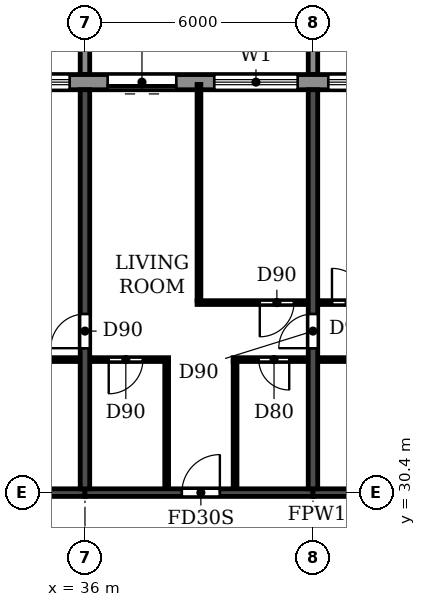
"""IFC4 building model, lengths in metres.
Left out: names, types, materials, properties, quantities, classifications, styles, units other than length and angle.
Written with IfcOpenShell. Run it as: python <this file> out.ifc"""

import sys

from ifc_helpers import new_model, si_unit, direction, frame, frame_2d, origin, place, context, subcontext, project, spatial, polyline, rectangle, outline, extrude, source, transform, mapped, element, fill, save


model = new_model("IFC4")
c1 = context("Model", 3, precision=1e-05, world=origin(), true_north=direction((0.0, 1.0)))
c2 = subcontext(c1, "Body", "Model", "MODEL_VIEW")
j1 = project(units=[si_unit("LENGTHUNIT", "METRE"), si_unit("PLANEANGLEUNIT", "RADIAN")], contexts=[c1])
p1 = place(None, origin())
s1 = spatial("IfcSite", under=j1, at=p1, CompositionType="ELEMENT")
p2 = place(p1, origin())
s2 = spatial("IfcBuilding", under=s1, at=p2, CompositionType="ELEMENT")
p3 = place(p2, frame((0.0, 0.0, 241.2)))
s3 = spatial("IfcBuildingStorey", under=s2, at=p3, CompositionType="ELEMENT", Elevation=241.2)
p4 = place(p3, frame((36.0, 30.5, 0.0), z_axis=(0.0, 0.0, 1.0), x_axis=(0.0, 1.0, 0.0)))
e1 = element("IfcWall", 1, at=p4, inside=s3, PredefinedType="SHEAR", context=c2, shape_type="SweptSolid", body=[
    extrude(rectangle(XDim=10.5, YDim=0.25, at=frame_2d((5.25, 0.0))), origin(), (0.0, 0.0, 1.0), 3.08),
])
p5 = place(p4, frame((3.7, 0.0, 0.0)))
e2 = element("IfcOpeningElement", 2, at=p5, cuts=e1, PredefinedType="OPENING", context=c2, shape_type="SweptSolid", body=[
    extrude(rectangle(XDim=0.9, YDim=2.1, at=frame_2d((0.45, 1.05))), frame((0.0, 0.135, 0.0), z_axis=(0.0, -1.0, 0.0), x_axis=(1.0, 0.0, 0.0)), (0.0, 0.0, 1.0), 0.27),
])
p6 = place(p3, frame((42.0, 30.5, 0.0), z_axis=(0.0, 0.0, 1.0), x_axis=(0.0, 1.0, 0.0)))
e3 = element("IfcWall", 3, at=p6, inside=s3, PredefinedType="SHEAR", context=c2, shape_type="SweptSolid", body=[
    extrude(rectangle(XDim=10.5, YDim=0.25, at=frame_2d((5.25, 0.0))), origin(), (0.0, 0.0, 1.0), 3.08),
])
p7 = place(p6, frame((3.7, 0.0, 0.0)))
e4 = element("IfcOpeningElement", 4, at=p7, cuts=e3, PredefinedType="OPENING", context=c2, shape_type="SweptSolid", body=[
    extrude(rectangle(XDim=0.9, YDim=2.1, at=frame_2d((0.45, 1.05))), frame((0.0, 0.135, 0.0), z_axis=(0.0, -1.0, 0.0), x_axis=(1.0, 0.0, 0.0)), (0.0, 0.0, 1.0), 0.27),
])
p8 = place(p3, frame((30.0, 30.4, 0.0), z_axis=(0.0, 0.0, 1.0), x_axis=(1.0, 0.0, 0.0)))
e5 = element("IfcWall", 5, at=p8, inside=s3, PredefinedType="SHEAR", context=c2, shape_type="SweptSolid", body=[
    extrude(rectangle(XDim=6.0, YDim=0.2, at=frame_2d((3.0, 0.0))), origin(), (0.0, 0.0, 1.0), 2.48),
])
p9 = place(p3, frame((36.0, 30.4, 0.0), z_axis=(0.0, 0.0, 1.0), x_axis=(1.0, 0.0, 0.0)))
e6 = element("IfcWall", 6, at=p9, inside=s3, PredefinedType="SHEAR", context=c2, shape_type="SweptSolid", body=[
    extrude(rectangle(XDim=6.0, YDim=0.2, at=frame_2d((3.0, 0.0))), origin(), (0.0, 0.0, 1.0), 2.48),
])
p10 = place(p9, frame((2.55, 0.0, 0.0)))
e7 = element("IfcOpeningElement", 7, at=p10, cuts=e6, PredefinedType="OPENING", context=c2, shape_type="SweptSolid", body=[
    extrude(rectangle(XDim=1.0, YDim=2.1, at=frame_2d((0.5, 1.05))), frame((0.0, 0.11, 0.0), z_axis=(0.0, -1.0, 0.0), x_axis=(1.0, 0.0, 0.0)), (0.0, 0.0, 1.0), 0.22),
])
p11 = place(p3, frame((42.0, 30.4, 0.0), z_axis=(0.0, 0.0, 1.0), x_axis=(1.0, 0.0, 0.0)))
e8 = element("IfcWall", 8, at=p11, inside=s3, PredefinedType="SHEAR", context=c2, shape_type="SweptSolid", body=[
    extrude(rectangle(XDim=6.0, YDim=0.2, at=frame_2d((3.0, 0.0))), origin(), (0.0, 0.0, 1.0), 2.48),
])
p12 = place(p3, frame((79.317, 41.2, 0.0), z_axis=(0.0, 0.0, 1.0), x_axis=(-1.0, 0.0, 0.0)))
e9 = element("IfcWall", 9, at=p12, inside=s3, PredefinedType="STANDARD", context=c2, shape_type="SweptSolid", body=[
    extrude(rectangle(XDim=56.634, YDim=0.4, at=frame_2d((28.317, 0.0))), origin(), (0.0, 0.0, 1.0), 3.08),
])
p13 = place(p12, frame((52.917, 0.0, 0.0)))
e10 = element("IfcOpeningElement", 10, at=p13, cuts=e9, PredefinedType="OPENING", context=c2, shape_type="SweptSolid", body=[
    extrude(rectangle(XDim=1.8, YDim=2.4, at=frame_2d((0.9, 1.2))), frame((0.0, 0.21, 0.0), z_axis=(0.0, -1.0, 0.0), x_axis=(1.0, 0.0, 0.0)), (0.0, 0.0, 1.0), 0.42),
])
p14 = place(p12, frame((49.717, 0.0, 0.9)))
e11 = element("IfcOpeningElement", 11, at=p14, cuts=e9, PredefinedType="OPENING", context=c2, shape_type="SweptSolid", body=[
    extrude(rectangle(XDim=2.2, YDim=1.5, at=frame_2d((1.1, 0.75))), frame((0.0, 0.21, 0.0), z_axis=(0.0, -1.0, 0.0), x_axis=(1.0, 0.0, 0.0)), (0.0, 0.0, 1.0), 0.42),
])
p15 = place(p12, frame((46.717, 0.0, 0.9)))
e12 = element("IfcOpeningElement", 12, at=p15, cuts=e9, PredefinedType="OPENING", context=c2, shape_type="SweptSolid", body=[
    extrude(rectangle(XDim=2.2, YDim=1.5, at=frame_2d((1.1, 0.75))), frame((0.0, 0.21, 0.0), z_axis=(0.0, -1.0, 0.0), x_axis=(1.0, 0.0, 0.0)), (0.0, 0.0, 1.0), 0.42),
])
p16 = place(p12, frame((43.717, 0.0, 0.9)))
e13 = element("IfcOpeningElement", 13, at=p16, cuts=e9, PredefinedType="OPENING", context=c2, shape_type="SweptSolid", body=[
    extrude(rectangle(XDim=2.2, YDim=1.5, at=frame_2d((1.1, 0.75))), frame((0.0, 0.21, 0.0), z_axis=(0.0, -1.0, 0.0), x_axis=(1.0, 0.0, 0.0)), (0.0, 0.0, 1.0), 0.42),
])
p17 = place(p12, frame((40.917, 0.0, 0.0)))
e14 = element("IfcOpeningElement", 14, at=p17, cuts=e9, PredefinedType="OPENING", context=c2, shape_type="SweptSolid", body=[
    extrude(rectangle(XDim=1.8, YDim=2.4, at=frame_2d((0.9, 1.2))), frame((0.0, 0.21, 0.0), z_axis=(0.0, -1.0, 0.0), x_axis=(1.0, 0.0, 0.0)), (0.0, 0.0, 1.0), 0.42),
])
p18 = place(p12, frame((37.717, 0.0, 0.9)))
e15 = element("IfcOpeningElement", 15, at=p18, cuts=e9, PredefinedType="OPENING", context=c2, shape_type="SweptSolid", body=[
    extrude(rectangle(XDim=2.2, YDim=1.5, at=frame_2d((1.1, 0.75))), frame((0.0, 0.21, 0.0), z_axis=(0.0, -1.0, 0.0), x_axis=(1.0, 0.0, 0.0)), (0.0, 0.0, 1.0), 0.42),
])
p19 = place(p12, frame((34.717, 0.0, 0.9)))
e16 = element("IfcOpeningElement", 16, at=p19, cuts=e9, PredefinedType="OPENING", context=c2, shape_type="SweptSolid", body=[
    extrude(rectangle(XDim=2.2, YDim=1.5, at=frame_2d((1.1, 0.75))), frame((0.0, 0.21, 0.0), z_axis=(0.0, -1.0, 0.0), x_axis=(1.0, 0.0, 0.0)), (0.0, 0.0, 1.0), 0.42),
])
p20 = place(p12, frame((31.717, 0.0, 0.9)))
e17 = element("IfcOpeningElement", 17, at=p20, cuts=e9, PredefinedType="OPENING", context=c2, shape_type="SweptSolid", body=[
    extrude(rectangle(XDim=2.2, YDim=1.5, at=frame_2d((1.1, 0.75))), frame((0.0, 0.21, 0.0), z_axis=(0.0, -1.0, 0.0), x_axis=(1.0, 0.0, 0.0)), (0.0, 0.0, 1.0), 0.42),
])
p21 = place(p12, frame((28.717, 0.0, 0.9)))
e18 = element("IfcOpeningElement", 18, at=p21, cuts=e9, PredefinedType="OPENING", context=c2, shape_type="SweptSolid", body=[
    extrude(rectangle(XDim=2.2, YDim=1.5, at=frame_2d((1.1, 0.75))), frame((0.0, 0.21, 0.0), z_axis=(0.0, -1.0, 0.0), x_axis=(1.0, 0.0, 0.0)), (0.0, 0.0, 1.0), 0.42),
])
p22 = place(p12, frame((25.917, 0.0, 0.0)))
e19 = element("IfcOpeningElement", 19, at=p22, cuts=e9, PredefinedType="OPENING", context=c2, shape_type="SweptSolid", body=[
    extrude(rectangle(XDim=1.8, YDim=2.4, at=frame_2d((0.9, 1.2))), frame((0.0, 0.21, 0.0), z_axis=(0.0, -1.0, 0.0), x_axis=(1.0, 0.0, 0.0)), (0.0, 0.0, 1.0), 0.42),
])
p23 = place(p12, frame((22.717, 0.0, 0.9)))
e20 = element("IfcOpeningElement", 20, at=p23, cuts=e9, PredefinedType="OPENING", context=c2, shape_type="SweptSolid", body=[
    extrude(rectangle(XDim=2.2, YDim=1.5, at=frame_2d((1.1, 0.75))), frame((0.0, 0.21, 0.0), z_axis=(0.0, -1.0, 0.0), x_axis=(1.0, 0.0, 0.0)), (0.0, 0.0, 1.0), 0.42),
])
p24 = place(p12, frame((19.717, 0.0, 0.9)))
e21 = element("IfcOpeningElement", 21, at=p24, cuts=e9, PredefinedType="OPENING", context=c2, shape_type="SweptSolid", body=[
    extrude(rectangle(XDim=2.2, YDim=1.5, at=frame_2d((1.1, 0.75))), frame((0.0, 0.21, 0.0), z_axis=(0.0, -1.0, 0.0), x_axis=(1.0, 0.0, 0.0)), (0.0, 0.0, 1.0), 0.42),
])
p25 = place(p12, frame((16.717, 0.0, 0.9)))
e22 = element("IfcOpeningElement", 22, at=p25, cuts=e9, PredefinedType="OPENING", context=c2, shape_type="SweptSolid", body=[
    extrude(rectangle(XDim=2.2, YDim=1.5, at=frame_2d((1.1, 0.75))), frame((0.0, 0.21, 0.0), z_axis=(0.0, -1.0, 0.0), x_axis=(1.0, 0.0, 0.0)), (0.0, 0.0, 1.0), 0.42),
])
p26 = place(p12, frame((13.917, 0.0, 0.0)))
e23 = element("IfcOpeningElement", 23, at=p26, cuts=e9, PredefinedType="OPENING", context=c2, shape_type="SweptSolid", body=[
    extrude(rectangle(XDim=1.8, YDim=2.4, at=frame_2d((0.9, 1.2))), frame((0.0, 0.21, 0.0), z_axis=(0.0, -1.0, 0.0), x_axis=(1.0, 0.0, 0.0)), (0.0, 0.0, 1.0), 0.42),
])
p27 = place(p12, frame((10.717, 0.0, 0.9)))
e24 = element("IfcOpeningElement", 24, at=p27, cuts=e9, PredefinedType="OPENING", context=c2, shape_type="SweptSolid", body=[
    extrude(rectangle(XDim=2.2, YDim=1.5, at=frame_2d((1.1, 0.75))), frame((0.0, 0.21, 0.0), z_axis=(0.0, -1.0, 0.0), x_axis=(1.0, 0.0, 0.0)), (0.0, 0.0, 1.0), 0.42),
])
p28 = place(p12, frame((7.917, 0.0, 0.0)))
e25 = element("IfcOpeningElement", 25, at=p28, cuts=e9, PredefinedType="OPENING", context=c2, shape_type="SweptSolid", body=[
    extrude(rectangle(XDim=1.8, YDim=2.4, at=frame_2d((0.9, 1.2))), frame((0.0, 0.21, 0.0), z_axis=(0.0, -1.0, 0.0), x_axis=(1.0, 0.0, 0.0)), (0.0, 0.0, 1.0), 0.42),
])
p29 = place(p12, frame((4.717, 0.0, 0.9)))
e26 = element("IfcOpeningElement", 26, at=p29, cuts=e9, PredefinedType="OPENING", context=c2, shape_type="SweptSolid", body=[
    extrude(rectangle(XDim=2.2, YDim=1.5, at=frame_2d((1.1, 0.75))), frame((0.0, 0.21, 0.0), z_axis=(0.0, -1.0, 0.0), x_axis=(1.0, 0.0, 0.0)), (0.0, 0.0, 1.0), 0.42),
])
p30 = place(p12, frame((1.917, 0.0, 0.0)))
e27 = element("IfcOpeningElement", 27, at=p30, cuts=e9, PredefinedType="OPENING", context=c2, shape_type="SweptSolid", body=[
    extrude(rectangle(XDim=1.8, YDim=2.4, at=frame_2d((0.9, 1.2))), frame((0.0, 0.21, 0.0), z_axis=(0.0, -1.0, 0.0), x_axis=(1.0, 0.0, 0.0)), (0.0, 0.0, 1.0), 0.42),
])
m1 = source(origin(), c2, "Body", "SweptSolid", [
    extrude(outline(polyline([(0.0, 0.0), (0.25, 0.0), (0.25, 3.1), (0.0, 3.1), (0.0, 0.0)])), origin(), (0.0, 0.0, 1.0), 3.1),
])
for number, where in (
    (28, (35.875, 41.4, 0.0)),
    (29, (41.875, 41.4, 0.0)),
):
    element("IfcWall", number, at=place(p3, frame(where)), inside=s3, PredefinedType="STANDARD", context=c2, shape_type="MappedRepresentation", body=[
        mapped(m1, transform((0.0, 0.0, 0.0))),
    ])
p31 = place(p3, frame((30.135, 33.9, 0.0), z_axis=(0.0, 0.0, 1.0), x_axis=(1.0, 0.0, 0.0)))
e30 = element("IfcWall", 30, at=p31, inside=s3, PredefinedType="PARTITIONING", context=c2, shape_type="SweptSolid", body=[
    extrude(rectangle(XDim=5.73, YDim=0.1, at=frame_2d((2.865, 0.0))), origin(), (0.0, 0.0, 1.0), 3.08),
])
p32 = place(p31, frame((0.965, 0.0, 0.0)))
e31 = element("IfcOpeningElement", 31, at=p32, cuts=e30, PredefinedType="OPENING", context=c2, shape_type="SweptSolid", body=[
    extrude(rectangle(XDim=0.8, YDim=2.1, at=frame_2d((0.4, 1.05))), frame((0.0, 0.06, 0.0), z_axis=(0.0, -1.0, 0.0), x_axis=(1.0, 0.0, 0.0)), (0.0, 0.0, 1.0), 0.12),
])
p33 = place(p31, frame((3.965, 0.0, 0.0)))
e32 = element("IfcOpeningElement", 32, at=p33, cuts=e30, PredefinedType="OPENING", context=c2, shape_type="SweptSolid", body=[
    extrude(rectangle(XDim=0.8, YDim=2.1, at=frame_2d((0.4, 1.05))), frame((0.0, 0.06, 0.0), z_axis=(0.0, -1.0, 0.0), x_axis=(1.0, 0.0, 0.0)), (0.0, 0.0, 1.0), 0.12),
])
p34 = place(p3, frame((36.135, 33.9, 0.0), z_axis=(0.0, 0.0, 1.0), x_axis=(1.0, 0.0, 0.0)))
e33 = element("IfcWall", 33, at=p34, inside=s3, PredefinedType="PARTITIONING", context=c2, shape_type="SweptSolid", body=[
    extrude(rectangle(XDim=2.065, YDim=0.1, at=frame_2d((1.032, 0.0))), origin(), (0.0, 0.0, 1.0), 3.08),
])
p35 = place(p34, frame((0.49, 0.0, 0.0)))
e34 = element("IfcOpeningElement", 34, at=p35, cuts=e33, PredefinedType="OPENING", context=c2, shape_type="SweptSolid", body=[
    extrude(rectangle(XDim=0.9, YDim=2.1, at=frame_2d((0.45, 1.05))), frame((0.0, 0.06, 0.0), z_axis=(0.0, -1.0, 0.0), x_axis=(1.0, 0.0, 0.0)), (0.0, 0.0, 1.0), 0.12),
])
p36 = place(p3, frame((39.9, 33.9, 0.0), z_axis=(0.0, 0.0, 1.0), x_axis=(1.0, 0.0, 0.0)))
e35 = element("IfcWall", 35, at=p36, inside=s3, PredefinedType="PARTITIONING", context=c2, shape_type="SweptSolid", body=[
    extrude(rectangle(XDim=1.965, YDim=0.1, at=frame_2d((0.982, 0.0))), origin(), (0.0, 0.0, 1.0), 3.08),
])
p37 = place(p36, frame((0.675, 0.0, 0.0)))
e36 = element("IfcOpeningElement", 36, at=p37, cuts=e35, PredefinedType="OPENING", context=c2, shape_type="SweptSolid", body=[
    extrude(rectangle(XDim=0.8, YDim=2.1, at=frame_2d((0.4, 1.05))), frame((0.0, 0.06, 0.0), z_axis=(0.0, -1.0, 0.0), x_axis=(1.0, 0.0, 0.0)), (0.0, 0.0, 1.0), 0.12),
])
p38 = place(p3, frame((42.135, 33.9, 0.0), z_axis=(0.0, 0.0, 1.0), x_axis=(1.0, 0.0, 0.0)))
e37 = element("IfcWall", 37, at=p38, inside=s3, PredefinedType="PARTITIONING", context=c2, shape_type="SweptSolid", body=[
    extrude(rectangle(XDim=2.765, YDim=0.1, at=frame_2d((1.382, 0.0))), origin(), (0.0, 0.0, 1.0), 3.08),
])
p39 = place(p38, frame((0.965, 0.0, 0.0)))
e38 = element("IfcOpeningElement", 38, at=p39, cuts=e37, PredefinedType="OPENING", context=c2, shape_type="SweptSolid", body=[
    extrude(rectangle(XDim=0.8, YDim=2.1, at=frame_2d((0.4, 1.05))), frame((0.0, 0.06, 0.0), z_axis=(0.0, -1.0, 0.0), x_axis=(1.0, 0.0, 0.0)), (0.0, 0.0, 1.0), 0.12),
])
p40 = place(p3, frame((38.95, 35.4, 0.0), z_axis=(0.0, 0.0, 1.0), x_axis=(1.0, 0.0, 0.0)))
e39 = element("IfcWall", 39, at=p40, inside=s3, PredefinedType="PARTITIONING", context=c2, shape_type="SweptSolid", body=[
    extrude(rectangle(XDim=2.915, YDim=0.1, at=frame_2d((1.458, 0.0))), origin(), (0.0, 0.0, 1.0), 3.08),
])
p41 = place(p40, frame((1.65, 0.0, 0.0)))
e40 = element("IfcOpeningElement", 40, at=p41, cuts=e39, PredefinedType="OPENING", context=c2, shape_type="SweptSolid", body=[
    extrude(rectangle(XDim=0.9, YDim=2.1, at=frame_2d((0.45, 1.05))), frame((0.0, 0.06, 0.0), z_axis=(0.0, -1.0, 0.0), x_axis=(1.0, 0.0, 0.0)), (0.0, 0.0, 1.0), 0.12),
])
p42 = place(p3, frame((42.135, 35.4, 0.0), z_axis=(0.0, 0.0, 1.0), x_axis=(1.0, 0.0, 0.0)))
e41 = element("IfcWall", 41, at=p42, inside=s3, PredefinedType="PARTITIONING", context=c2, shape_type="SweptSolid", body=[
    extrude(rectangle(XDim=2.765, YDim=0.1, at=frame_2d((1.382, 0.0))), origin(), (0.0, 0.0, 1.0), 3.08),
])
p43 = place(p42, frame((0.365, 0.0, 0.0)))
e42 = element("IfcOpeningElement", 42, at=p43, cuts=e41, PredefinedType="OPENING", context=c2, shape_type="SweptSolid", body=[
    extrude(rectangle(XDim=0.9, YDim=2.1, at=frame_2d((0.45, 1.05))), frame((0.0, 0.06, 0.0), z_axis=(0.0, -1.0, 0.0), x_axis=(1.0, 0.0, 0.0)), (0.0, 0.0, 1.0), 0.12),
])
p44 = place(p3, frame((38.15, 30.51, 0.0), z_axis=(0.0, 0.0, 1.0), x_axis=(0.0, 1.0, 0.0)))
e43 = element("IfcWall", 43, at=p44, inside=s3, PredefinedType="PARTITIONING", context=c2, shape_type="SweptSolid", body=[
    extrude(rectangle(XDim=3.34, YDim=0.1, at=frame_2d((1.67, 0.0))), origin(), (0.0, 0.0, 1.0), 3.08),
])
p45 = place(p3, frame((39.0, 35.45, 0.0), z_axis=(0.0, 0.0, 1.0), x_axis=(0.0, 1.0, 0.0)))
e44 = element("IfcWall", 44, at=p45, inside=s3, PredefinedType="PARTITIONING", context=c2, shape_type="SweptSolid", body=[
    extrude(rectangle(XDim=5.69, YDim=0.1, at=frame_2d((2.845, 0.0))), origin(), (0.0, 0.0, 1.0), 3.08),
])
p46 = place(p3, frame((39.95, 30.51, 0.0), z_axis=(0.0, 0.0, 1.0), x_axis=(0.0, 1.0, 0.0)))
e45 = element("IfcWall", 45, at=p46, inside=s3, PredefinedType="PARTITIONING", context=c2, shape_type="SweptSolid", body=[
    extrude(rectangle(XDim=3.34, YDim=0.1, at=frame_2d((1.67, 0.0))), origin(), (0.0, 0.0, 1.0), 3.08),
])
p47 = place(p16, origin())
e46 = element("IfcWindow", 46, at=p47, inside=s3, PartitioningType="DOUBLE_PANEL_HORIZONTAL", PredefinedType="WINDOW", context=c2, shape_type="SweptSolid", body=[
    extrude(rectangle(XDim=2.2, YDim=1.5, at=frame_2d((1.1, 0.75))), frame((0.0, 0.03, 0.0), z_axis=(0.0, -1.0, 0.0), x_axis=(1.0, 0.0, 0.0)), (0.0, 0.0, 1.0), 0.06),
])
fill(e13, e46)
p48 = place(p17, origin())
e47 = element("IfcDoor", 47, at=p48, inside=s3, OperationType="DOUBLE_DOOR_SLIDING", PredefinedType="DOOR", context=c2, shape_type="SweptSolid", body=[
    extrude(rectangle(XDim=1.8, YDim=2.4, at=frame_2d((0.9, 1.2))), frame((0.0, 0.025, 0.0), z_axis=(0.0, -1.0, 0.0), x_axis=(1.0, 0.0, 0.0)), (0.0, 0.0, 1.0), 0.05),
])
fill(e14, e47)
p49 = place(p18, origin())
e48 = element("IfcWindow", 48, at=p49, inside=s3, PartitioningType="DOUBLE_PANEL_HORIZONTAL", PredefinedType="WINDOW", context=c2, shape_type="SweptSolid", body=[
    extrude(rectangle(XDim=2.2, YDim=1.5, at=frame_2d((1.1, 0.75))), frame((0.0, 0.03, 0.0), z_axis=(0.0, -1.0, 0.0), x_axis=(1.0, 0.0, 0.0)), (0.0, 0.0, 1.0), 0.06),
])
fill(e15, e48)
p50 = place(p19, origin())
e49 = element("IfcWindow", 49, at=p50, inside=s3, PartitioningType="DOUBLE_PANEL_HORIZONTAL", PredefinedType="WINDOW", context=c2, shape_type="SweptSolid", body=[
    extrude(rectangle(XDim=2.2, YDim=1.5, at=frame_2d((1.1, 0.75))), frame((0.0, 0.03, 0.0), z_axis=(0.0, -1.0, 0.0), x_axis=(1.0, 0.0, 0.0)), (0.0, 0.0, 1.0), 0.06),
])
fill(e16, e49)
p51 = place(p43, origin())
e50 = element("IfcDoor", 50, at=p51, inside=s3, OperationType="SINGLE_SWING_LEFT", PredefinedType="DOOR", context=c2, shape_type="SweptSolid", body=[
    extrude(rectangle(XDim=0.9, YDim=2.1, at=frame_2d((0.45, 1.05))), frame((0.0, 0.025, 0.0), z_axis=(0.0, -1.0, 0.0), x_axis=(1.0, 0.0, 0.0)), (0.0, 0.0, 1.0), 0.05),
])
fill(e42, e50)
p52 = place(p5, origin())
e51 = element("IfcDoor", 51, at=p52, inside=s3, OperationType="SINGLE_SWING_LEFT", PredefinedType="DOOR", context=c2, shape_type="SweptSolid", body=[
    extrude(rectangle(XDim=0.9, YDim=2.1, at=frame_2d((0.45, 1.05))), frame((0.0, 0.025, 0.0), z_axis=(0.0, -1.0, 0.0), x_axis=(1.0, 0.0, 0.0)), (0.0, 0.0, 1.0), 0.05),
])
fill(e2, e51)
p53 = place(p35, frame((0.9, 0.0, 0.0), z_axis=(0.0, 0.0, 1.0), x_axis=(-1.0, 0.0, 0.0)))
e52 = element("IfcDoor", 52, at=p53, inside=s3, OperationType="SINGLE_SWING_RIGHT", PredefinedType="DOOR", context=c2, shape_type="SweptSolid", body=[
    extrude(rectangle(XDim=0.9, YDim=2.1, at=frame_2d((0.45, 1.05))), frame((0.0, 0.025, 0.0), z_axis=(0.0, -1.0, 0.0), x_axis=(1.0, 0.0, 0.0)), (0.0, 0.0, 1.0), 0.05),
])
fill(e34, e52)
p54 = place(p10, origin())
e53 = element("IfcDoor", 53, at=p54, inside=s3, OperationType="SINGLE_SWING_RIGHT", PredefinedType="DOOR", context=c2, shape_type="SweptSolid", body=[
    extrude(rectangle(XDim=1.0, YDim=2.1, at=frame_2d((0.5, 1.05))), frame((0.0, 0.025, 0.0), z_axis=(0.0, -1.0, 0.0), x_axis=(1.0, 0.0, 0.0)), (0.0, 0.0, 1.0), 0.05),
])
fill(e7, e53)
p55 = place(p37, frame((0.8, 0.0, 0.0), z_axis=(0.0, 0.0, 1.0), x_axis=(-1.0, 0.0, 0.0)))
e54 = element("IfcDoor", 54, at=p55, inside=s3, OperationType="SINGLE_SWING_LEFT", PredefinedType="DOOR", context=c2, shape_type="SweptSolid", body=[
    extrude(rectangle(XDim=0.8, YDim=2.1, at=frame_2d((0.4, 1.05))), frame((0.0, 0.025, 0.0), z_axis=(0.0, -1.0, 0.0), x_axis=(1.0, 0.0, 0.0)), (0.0, 0.0, 1.0), 0.05),
])
fill(e36, e54)
p56 = place(p41, frame((0.9, 0.0, 0.0), z_axis=(0.0, 0.0, 1.0), x_axis=(-1.0, 0.0, 0.0)))
e55 = element("IfcDoor", 55, at=p56, inside=s3, OperationType="SINGLE_SWING_RIGHT", PredefinedType="DOOR", context=c2, shape_type="SweptSolid", body=[
    extrude(rectangle(XDim=0.9, YDim=2.1, at=frame_2d((0.45, 1.05))), frame((0.0, 0.025, 0.0), z_axis=(0.0, -1.0, 0.0), x_axis=(1.0, 0.0, 0.0)), (0.0, 0.0, 1.0), 0.05),
])
fill(e40, e55)
p57 = place(p7, origin())
e56 = element("IfcDoor", 56, at=p57, inside=s3, OperationType="SINGLE_SWING_LEFT", PredefinedType="DOOR", context=c2, shape_type="SweptSolid", body=[
    extrude(rectangle(XDim=0.9, YDim=2.1, at=frame_2d((0.45, 1.05))), frame((0.0, 0.025, 0.0), z_axis=(0.0, -1.0, 0.0), x_axis=(1.0, 0.0, 0.0)), (0.0, 0.0, 1.0), 0.05),
])
fill(e4, e56)
save(model, sys.argv[1])
